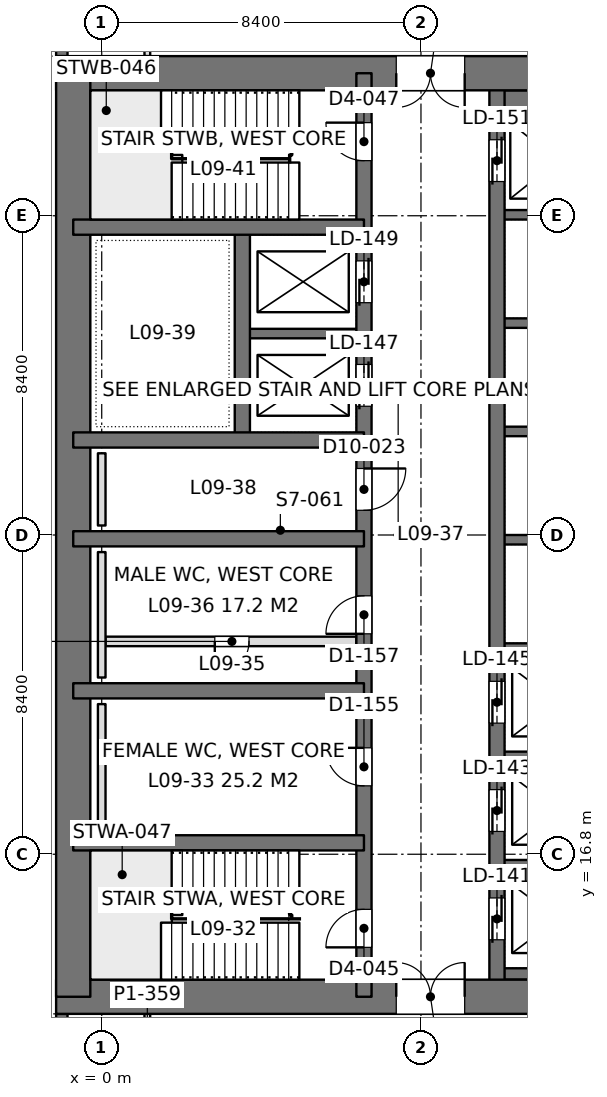
"""IFC4 building model, lengths in metres.
Left out: names, types, materials, properties, quantities, classifications, styles, units other than length and angle.
Written with IfcOpenShell. Run it as: python <this file> out.ifc"""

import sys

from ifc_helpers import new_model, si_unit, direction, frame, frame_2d, origin, place, context, subcontext, project, spatial, rectangle, extrude, element, fill, save


model = new_model("IFC4")
c1 = context("Model", 3, precision=1e-05, world=origin(), true_north=direction((0.0, 1.0)))
c2 = subcontext(c1, "Body", "Model", "MODEL_VIEW")
j1 = project(units=[si_unit("LENGTHUNIT", "METRE"), si_unit("PLANEANGLEUNIT", "RADIAN")], contexts=[c1])
p1 = place(None, origin())
s1 = spatial("IfcSite", under=j1, at=p1, CompositionType="ELEMENT")
p2 = place(p1, origin())
s2 = spatial("IfcBuilding", under=s1, at=p2, CompositionType="ELEMENT")
p3 = place(p2, frame((0.0, 0.0, 41.4)))
s3 = spatial("IfcBuildingStorey", under=s2, at=p3, CompositionType="ELEMENT", Elevation=41.4)
p4 = place(p3, frame((-1.2, 13.05, 0.0), z_axis=(0.0, 0.0, 1.0), x_axis=(1.0, 0.0, 0.0)))
e1 = element("IfcWall", 1, at=p4, inside=s3, PredefinedType="SHEAR", context=c2, shape_type="SweptSolid", body=[
    extrude(rectangle(XDim=18.0, YDim=0.9, at=frame_2d((9.0, 0.0))), origin(), (0.0, 0.0, 1.0), 4.5),
])
p5 = place(p4, frame((8.95, 0.0, 0.0)))
e2 = element("IfcOpeningElement", 2, at=p5, cuts=e1, PredefinedType="OPENING", context=c2, shape_type="SweptSolid", body=[
    extrude(rectangle(XDim=1.8, YDim=2.4, at=frame_2d((0.9, 1.2))), frame((0.0, 0.46, 0.0), z_axis=(0.0, -1.0, 0.0), x_axis=(1.0, 0.0, 0.0)), (0.0, 0.0, 1.0), 0.92),
])
p6 = place(p3, frame((-1.2, 37.35, 0.0), z_axis=(0.0, 0.0, 1.0), x_axis=(1.0, 0.0, 0.0)))
e3 = element("IfcWall", 3, at=p6, inside=s3, PredefinedType="SHEAR", context=c2, shape_type="SweptSolid", body=[
    extrude(rectangle(XDim=18.0, YDim=0.9, at=frame_2d((9.0, 0.0))), origin(), (0.0, 0.0, 1.0), 4.5),
])
p7 = place(p6, frame((8.95, 0.0, 0.0)))
e4 = element("IfcOpeningElement", 4, at=p7, cuts=e3, PredefinedType="OPENING", context=c2, shape_type="SweptSolid", body=[
    extrude(rectangle(XDim=1.8, YDim=2.4, at=frame_2d((0.9, 1.2))), frame((0.0, 0.46, 0.0), z_axis=(0.0, -1.0, 0.0), x_axis=(1.0, 0.0, 0.0)), (0.0, 0.0, 1.0), 0.92),
])
p8 = place(p3, frame((-0.75, 13.05, 0.0), z_axis=(0.0, 0.0, 1.0), x_axis=(0.0, 1.0, 0.0)))
e5 = element("IfcWall", 5, at=p8, inside=s3, PredefinedType="SHEAR", context=c2, shape_type="SweptSolid", body=[
    extrude(rectangle(XDim=24.3, YDim=0.9, at=frame_2d((12.15, 0.0))), origin(), (0.0, 0.0, 1.0), 4.5),
])
p9 = place(p3, frame((6.9, 13.05, 0.0), z_axis=(0.0, 0.0, 1.0), x_axis=(0.0, 1.0, 0.0)))
e6 = element("IfcWall", 6, at=p9, inside=s3, PredefinedType="SHEAR", context=c2, shape_type="SweptSolid", body=[
    extrude(rectangle(XDim=24.3, YDim=0.4, at=frame_2d((12.15, 0.0))), origin(), (0.0, 0.0, 1.0), 4.5),
])
p10 = place(p9, frame((1.3, 0.0, 0.0)))
e7 = element("IfcOpeningElement", 7, at=p10, cuts=e6, PredefinedType="OPENING", context=c2, shape_type="SweptSolid", body=[
    extrude(rectangle(XDim=1.0, YDim=2.2, at=frame_2d((0.5, 1.1))), frame((0.0, 0.21, 0.0), z_axis=(0.0, -1.0, 0.0), x_axis=(1.0, 0.0, 0.0)), (0.0, 0.0, 1.0), 0.42),
])
p11 = place(p9, frame((22.0, 0.0, 0.0)))
e8 = element("IfcOpeningElement", 8, at=p11, cuts=e6, PredefinedType="OPENING", context=c2, shape_type="SweptSolid", body=[
    extrude(rectangle(XDim=1.0, YDim=2.2, at=frame_2d((0.5, 1.1))), frame((0.0, 0.21, 0.0), z_axis=(0.0, -1.0, 0.0), x_axis=(1.0, 0.0, 0.0)), (0.0, 0.0, 1.0), 0.42),
])
p12 = place(p9, frame((5.55, 0.0, 0.0)))
e9 = element("IfcOpeningElement", 9, at=p12, cuts=e6, PredefinedType="OPENING", context=c2, shape_type="SweptSolid", body=[
    extrude(rectangle(XDim=1.0, YDim=2.2, at=frame_2d((0.5, 1.1))), frame((0.0, 0.21, 0.0), z_axis=(0.0, -1.0, 0.0), x_axis=(1.0, 0.0, 0.0)), (0.0, 0.0, 1.0), 0.42),
])
p13 = place(p9, frame((9.55, 0.0, 0.0)))
e10 = element("IfcOpeningElement", 10, at=p13, cuts=e6, PredefinedType="OPENING", context=c2, shape_type="SweptSolid", body=[
    extrude(rectangle(XDim=1.0, YDim=2.2, at=frame_2d((0.5, 1.1))), frame((0.0, 0.21, 0.0), z_axis=(0.0, -1.0, 0.0), x_axis=(1.0, 0.0, 0.0)), (0.0, 0.0, 1.0), 0.42),
])
p14 = place(p9, frame((12.8, 0.0, 0.0)))
e11 = element("IfcOpeningElement", 11, at=p14, cuts=e6, PredefinedType="OPENING", context=c2, shape_type="SweptSolid", body=[
    extrude(rectangle(XDim=1.1, YDim=2.2, at=frame_2d((0.55, 1.1))), frame((0.0, 0.21, 0.0), z_axis=(0.0, -1.0, 0.0), x_axis=(1.0, 0.0, 0.0)), (0.0, 0.0, 1.0), 0.42),
])
p15 = place(p9, frame((15.538, 0.0, 0.0)))
e12 = element("IfcOpeningElement", 12, at=p15, cuts=e6, PredefinedType="OPENING", context=c2, shape_type="SweptSolid", body=[
    extrude(rectangle(XDim=1.1, YDim=2.2, at=frame_2d((0.55, 1.1))), frame((0.0, 0.21, 0.0), z_axis=(0.0, -1.0, 0.0), x_axis=(1.0, 0.0, 0.0)), (0.0, 0.0, 1.0), 0.42),
])
p16 = place(p9, frame((18.262, 0.0, 0.0)))
e13 = element("IfcOpeningElement", 13, at=p16, cuts=e6, PredefinedType="OPENING", context=c2, shape_type="SweptSolid", body=[
    extrude(rectangle(XDim=1.1, YDim=2.2, at=frame_2d((0.55, 1.1))), frame((0.0, 0.21, 0.0), z_axis=(0.0, -1.0, 0.0), x_axis=(1.0, 0.0, 0.0)), (0.0, 0.0, 1.0), 0.42),
])
p17 = place(p3, frame((10.4, 13.05, 0.0), z_axis=(0.0, 0.0, 1.0), x_axis=(0.0, 1.0, 0.0)))
e14 = element("IfcWall", 14, at=p17, inside=s3, PredefinedType="SHEAR", context=c2, shape_type="SweptSolid", body=[
    extrude(rectangle(XDim=24.3, YDim=0.4, at=frame_2d((12.15, 0.0))), origin(), (0.0, 0.0, 1.0), 4.5),
])
p18 = place(p17, frame((1.5, 0.0, 0.0)))
e15 = element("IfcOpeningElement", 15, at=p18, cuts=e14, PredefinedType="OPENING", context=c2, shape_type="SweptSolid", body=[
    extrude(rectangle(XDim=1.1, YDim=2.2, at=frame_2d((0.55, 1.1))), frame((0.0, 0.21, 0.0), z_axis=(0.0, -1.0, 0.0), x_axis=(1.0, 0.0, 0.0)), (0.0, 0.0, 1.0), 0.42),
])
p19 = place(p17, frame((4.35, 0.0, 0.0)))
e16 = element("IfcOpeningElement", 16, at=p19, cuts=e14, PredefinedType="OPENING", context=c2, shape_type="SweptSolid", body=[
    extrude(rectangle(XDim=1.1, YDim=2.2, at=frame_2d((0.55, 1.1))), frame((0.0, 0.21, 0.0), z_axis=(0.0, -1.0, 0.0), x_axis=(1.0, 0.0, 0.0)), (0.0, 0.0, 1.0), 0.42),
])
p20 = place(p17, frame((7.2, 0.0, 0.0)))
e17 = element("IfcOpeningElement", 17, at=p20, cuts=e14, PredefinedType="OPENING", context=c2, shape_type="SweptSolid", body=[
    extrude(rectangle(XDim=1.1, YDim=2.2, at=frame_2d((0.55, 1.1))), frame((0.0, 0.21, 0.0), z_axis=(0.0, -1.0, 0.0), x_axis=(1.0, 0.0, 0.0)), (0.0, 0.0, 1.0), 0.42),
])
p21 = place(p17, frame((21.45, 0.0, 0.0)))
e18 = element("IfcOpeningElement", 18, at=p21, cuts=e14, PredefinedType="OPENING", context=c2, shape_type="SweptSolid", body=[
    extrude(rectangle(XDim=1.1, YDim=2.2, at=frame_2d((0.55, 1.1))), frame((0.0, 0.21, 0.0), z_axis=(0.0, -1.0, 0.0), x_axis=(1.0, 0.0, 0.0)), (0.0, 0.0, 1.0), 0.42),
])
for number, where, z_axis, x_axis in (
    (19, (-0.75, 17.1, 0.0), (0.0, 0.0, 1.0), (1.0, 0.0, 0.0)),
    (20, (-0.75, 21.1, 0.0), (0.0, 0.0, 1.0), (1.0, 0.0, 0.0)),
    (21, (-0.75, 25.1, 0.0), (0.0, 0.0, 1.0), (1.0, 0.0, 0.0)),
    (22, (-0.75, 27.7, 0.0), (0.0, 0.0, 1.0), (1.0, 0.0, 0.0)),
    (23, (-0.75, 33.3, 0.0), (0.0, 0.0, 1.0), (1.0, 0.0, 0.0)),
):
    element("IfcWall", number, at=place(p3, frame(where, z_axis=z_axis, x_axis=x_axis)), inside=s3, PredefinedType="SHEAR", context=c2, shape_type="SweptSolid", body=[
        extrude(rectangle(XDim=7.65, YDim=0.4, at=frame_2d((3.825, 0.0))), origin(), (0.0, 0.0, 1.0), 4.5),
    ])
p22 = place(p3, frame((3.7, 27.7, 0.0), z_axis=(0.0, 0.0, 1.0), x_axis=(0.0, 1.0, 0.0)))
e24 = element("IfcWall", 24, at=p22, inside=s3, PredefinedType="SHEAR", context=c2, shape_type="SweptSolid", body=[
    extrude(rectangle(XDim=5.6, YDim=0.4, at=frame_2d((2.8, 0.0))), origin(), (0.0, 0.0, 1.0), 4.5),
])
p23 = place(p3, frame((3.7, 30.5, 0.0), z_axis=(0.0, 0.0, 1.0), x_axis=(1.0, 0.0, 0.0)))
e25 = element("IfcWall", 25, at=p23, inside=s3, PredefinedType="SHEAR", context=c2, shape_type="SweptSolid", body=[
    extrude(rectangle(XDim=3.2, YDim=0.25, at=frame_2d((1.6, 0.0))), origin(), (0.0, 0.0, 1.0), 4.5),
])
p24 = place(p3, frame((10.4, 13.65, 0.0), z_axis=(0.0, 0.0, 1.0), x_axis=(1.0, 0.0, 0.0)))
e26 = element("IfcWall", 26, at=p24, inside=s3, PredefinedType="SHEAR", context=c2, shape_type="SweptSolid", body=[
    extrude(rectangle(XDim=3.2, YDim=0.3, at=frame_2d((1.6, 0.0))), origin(), (0.0, 0.0, 1.0), 4.5),
])
for number, where, z_axis, x_axis in (
    (27, (10.4, 16.525, 0.0), (0.0, 0.0, 1.0), (1.0, 0.0, 0.0)),
    (28, (10.4, 19.375, 0.0), (0.0, 0.0, 1.0), (1.0, 0.0, 0.0)),
    (29, (10.4, 22.225, 0.0), (0.0, 0.0, 1.0), (1.0, 0.0, 0.0)),
    (30, (10.4, 25.075, 0.0), (0.0, 0.0, 1.0), (1.0, 0.0, 0.0)),
    (31, (10.4, 27.925, 0.0), (0.0, 0.0, 1.0), (1.0, 0.0, 0.0)),
    (32, (10.4, 30.775, 0.0), (0.0, 0.0, 1.0), (1.0, 0.0, 0.0)),
    (33, (10.4, 33.625, 0.0), (0.0, 0.0, 1.0), (1.0, 0.0, 0.0)),
):
    element("IfcWall", number, at=place(p3, frame(where, z_axis=z_axis, x_axis=x_axis)), inside=s3, PredefinedType="SHEAR", context=c2, shape_type="SweptSolid", body=[
        extrude(rectangle(XDim=3.2, YDim=0.25, at=frame_2d((1.6, 0.0))), origin(), (0.0, 0.0, 1.0), 4.5),
    ])
p25 = place(p3, frame((10.4, 36.625, 0.0), z_axis=(0.0, 0.0, 1.0), x_axis=(1.0, 0.0, 0.0)))
e34 = element("IfcWall", 34, at=p25, inside=s3, PredefinedType="SHEAR", context=c2, shape_type="SweptSolid", body=[
    extrude(rectangle(XDim=3.2, YDim=0.55, at=frame_2d((1.6, 0.0))), origin(), (0.0, 0.0, 1.0), 4.5),
])
p26 = place(p3, frame((-1.05, 8.4, 0.0), z_axis=(0.0, 0.0, 1.0), x_axis=(0.0, 1.0, 0.0)))
e35 = element("IfcWall", 35, at=p26, inside=s3, PredefinedType="SOLIDWALL", context=c2, shape_type="SweptSolid", body=[
    extrude(rectangle(XDim=4.2, YDim=0.3, at=frame_2d((2.1, 0.0))), origin(), (0.0, 0.0, 1.0), 4.34),
])
p27 = place(p26, frame((0.9, 0.0, 0.9)))
e36 = element("IfcOpeningElement", 36, at=p27, cuts=e35, PredefinedType="OPENING", context=c2, shape_type="SweptSolid", body=[
    extrude(rectangle(XDim=2.4, YDim=1.9, at=frame_2d((1.2, 0.95))), frame((0.0, 0.16, 0.0), z_axis=(0.0, -1.0, 0.0), x_axis=(1.0, 0.0, 0.0)), (0.0, 0.0, 1.0), 0.32),
])
p28 = place(p3, frame((-1.05, 37.8, 0.0), z_axis=(0.0, 0.0, 1.0), x_axis=(0.0, 1.0, 0.0)))
e37 = element("IfcWall", 37, at=p28, inside=s3, PredefinedType="SOLIDWALL", context=c2, shape_type="SweptSolid", body=[
    extrude(rectangle(XDim=4.2, YDim=0.3, at=frame_2d((2.1, 0.0))), origin(), (0.0, 0.0, 1.0), 4.34),
])
p29 = place(p28, frame((0.9, 0.0, 0.9)))
e38 = element("IfcOpeningElement", 38, at=p29, cuts=e37, PredefinedType="OPENING", context=c2, shape_type="SweptSolid", body=[
    extrude(rectangle(XDim=2.4, YDim=1.9, at=frame_2d((1.2, 0.95))), frame((0.0, 0.16, 0.0), z_axis=(0.0, -1.0, 0.0), x_axis=(1.0, 0.0, 0.0)), (0.0, 0.0, 1.0), 0.32),
])
p30 = place(p3, frame((1.2, 10.4, 0.0), z_axis=(0.0, 0.0, 1.0), x_axis=(0.0, 1.0, 0.0)))
e39 = element("IfcWall", 39, at=p30, inside=s3, PredefinedType="PARTITIONING", context=c2, shape_type="SweptSolid", body=[
    extrude(rectangle(XDim=2.202, YDim=0.15, at=frame_2d((1.101, 0.0))), origin(), (0.0, 0.0, 1.0), 4.34),
])
p31 = place(p3, frame((1.2, 37.8, 0.0), z_axis=(0.0, 0.0, 1.0), x_axis=(0.0, 1.0, 0.0)))
e40 = element("IfcWall", 40, at=p31, inside=s3, PredefinedType="PARTITIONING", context=c2, shape_type="SweptSolid", body=[
    extrude(rectangle(XDim=2.2, YDim=0.15, at=frame_2d((1.1, 0.0))), origin(), (0.0, 0.0, 1.0), 4.34),
])
p32 = place(p3, frame((0.1, 22.4, 0.0), z_axis=(0.0, 0.0, 1.0), x_axis=(1.0, 0.0, 0.0)))
e41 = element("IfcWall", 41, at=p32, inside=s3, PredefinedType="PARTITIONING", context=c2, shape_type="SweptSolid", body=[
    extrude(rectangle(XDim=6.6, YDim=0.25, at=frame_2d((3.3, 0.0))), origin(), (0.0, 0.0, 1.0), 4.3),
])
p33 = place(p32, frame((2.875, 0.0, 0.0)))
e42 = element("IfcOpeningElement", 42, at=p33, cuts=e41, PredefinedType="OPENING", context=c2, shape_type="SweptSolid", body=[
    extrude(rectangle(XDim=0.9, YDim=2.2, at=frame_2d((0.45, 1.1))), frame((0.0, 0.135, 0.0), z_axis=(0.0, -1.0, 0.0), x_axis=(1.0, 0.0, 0.0)), (0.0, 0.0, 1.0), 0.27),
])
for number, where, z_axis, x_axis in (
    (43, (0.0, 17.45, 0.0), (0.0, 0.0, 1.0), (0.0, 1.0, 0.0)),
    (44, (0.0, 21.45, 0.0), (0.0, 0.0, 1.0), (0.0, 1.0, 0.0)),
):
    element("IfcWall", number, at=place(p3, frame(where, z_axis=z_axis, x_axis=x_axis)), inside=s3, PredefinedType="PLUMBINGWALL", context=c2, shape_type="SweptSolid", body=[
        extrude(rectangle(XDim=3.3, YDim=0.2, at=frame_2d((1.65, 0.0))), origin(), (0.0, 0.0, 1.0), 1.2),
    ])
p34 = place(p3, frame((0.0, 25.45, 0.0), z_axis=(0.0, 0.0, 1.0), x_axis=(0.0, 1.0, 0.0)))
e45 = element("IfcWall", 45, at=p34, inside=s3, PredefinedType="PLUMBINGWALL", context=c2, shape_type="SweptSolid", body=[
    extrude(rectangle(XDim=1.9, YDim=0.2, at=frame_2d((0.95, 0.0))), origin(), (0.0, 0.0, 1.0), 1.2),
])
p35 = place(p5, origin())
e46 = element("IfcDoor", 46, at=p35, inside=s3, OperationType="DOUBLE_DOOR_SINGLE_SWING", PredefinedType="DOOR", context=c2, shape_type="SweptSolid", body=[
    extrude(rectangle(XDim=1.8, YDim=2.4, at=frame_2d((0.9, 1.2))), frame((0.0, 0.025, 0.0), z_axis=(0.0, -1.0, 0.0), x_axis=(1.0, 0.0, 0.0)), (0.0, 0.0, 1.0), 0.05),
])
fill(e2, e46)
p36 = place(p7, frame((1.8, 0.0, 0.0), z_axis=(0.0, 0.0, 1.0), x_axis=(-1.0, 0.0, 0.0)))
e47 = element("IfcDoor", 47, at=p36, inside=s3, OperationType="DOUBLE_DOOR_SINGLE_SWING", PredefinedType="DOOR", context=c2, shape_type="SweptSolid", body=[
    extrude(rectangle(XDim=1.8, YDim=2.4, at=frame_2d((0.9, 1.2))), frame((0.0, 0.025, 0.0), z_axis=(0.0, -1.0, 0.0), x_axis=(1.0, 0.0, 0.0)), (0.0, 0.0, 1.0), 0.05),
])
fill(e4, e47)
p37 = place(p10, origin())
e48 = element("IfcDoor", 48, at=p37, inside=s3, OperationType="SINGLE_SWING_LEFT", PredefinedType="DOOR", context=c2, shape_type="SweptSolid", body=[
    extrude(rectangle(XDim=1.0, YDim=2.2, at=frame_2d((0.5, 1.1))), frame((0.0, 0.025, 0.0), z_axis=(0.0, -1.0, 0.0), x_axis=(1.0, 0.0, 0.0)), (0.0, 0.0, 1.0), 0.05),
])
fill(e7, e48)
p38 = place(p11, origin())
e49 = element("IfcDoor", 49, at=p38, inside=s3, OperationType="SINGLE_SWING_RIGHT", PredefinedType="DOOR", context=c2, shape_type="SweptSolid", body=[
    extrude(rectangle(XDim=1.0, YDim=2.2, at=frame_2d((0.5, 1.1))), frame((0.0, 0.025, 0.0), z_axis=(0.0, -1.0, 0.0), x_axis=(1.0, 0.0, 0.0)), (0.0, 0.0, 1.0), 0.05),
])
fill(e8, e49)
p39 = place(p12, origin())
e50 = element("IfcDoor", 50, at=p39, inside=s3, OperationType="SINGLE_SWING_RIGHT", PredefinedType="DOOR", context=c2, shape_type="SweptSolid", body=[
    extrude(rectangle(XDim=1.0, YDim=2.2, at=frame_2d((0.5, 1.1))), frame((0.0, 0.025, 0.0), z_axis=(0.0, -1.0, 0.0), x_axis=(1.0, 0.0, 0.0)), (0.0, 0.0, 1.0), 0.05),
])
fill(e9, e50)
p40 = place(p13, origin())
e51 = element("IfcDoor", 51, at=p40, inside=s3, OperationType="SINGLE_SWING_LEFT", PredefinedType="DOOR", context=c2, shape_type="SweptSolid", body=[
    extrude(rectangle(XDim=1.0, YDim=2.2, at=frame_2d((0.5, 1.1))), frame((0.0, 0.025, 0.0), z_axis=(0.0, -1.0, 0.0), x_axis=(1.0, 0.0, 0.0)), (0.0, 0.0, 1.0), 0.05),
])
fill(e10, e51)
p41 = place(p14, frame((1.1, 0.0, 0.0), z_axis=(0.0, 0.0, 1.0), x_axis=(-1.0, 0.0, 0.0)))
e52 = element("IfcDoor", 52, at=p41, inside=s3, OperationType="SINGLE_SWING_LEFT", PredefinedType="DOOR", context=c2, shape_type="SweptSolid", body=[
    extrude(rectangle(XDim=1.1, YDim=2.2, at=frame_2d((0.55, 1.1))), frame((0.0, 0.025, 0.0), z_axis=(0.0, -1.0, 0.0), x_axis=(1.0, 0.0, 0.0)), (0.0, 0.0, 1.0), 0.05),
])
fill(e11, e52)
p42 = place(p18, origin())
e53 = element("IfcDoor", 53, at=p42, inside=s3, OperationType="DOUBLE_DOOR_SLIDING", PredefinedType="DOOR", context=c2, shape_type="SweptSolid", body=[
    extrude(rectangle(XDim=1.1, YDim=2.2, at=frame_2d((0.55, 1.1))), frame((0.0, 0.025, 0.0), z_axis=(0.0, -1.0, 0.0), x_axis=(1.0, 0.0, 0.0)), (0.0, 0.0, 1.0), 0.05),
])
fill(e15, e53)
p43 = place(p19, origin())
e54 = element("IfcDoor", 54, at=p43, inside=s3, OperationType="DOUBLE_DOOR_SLIDING", PredefinedType="DOOR", context=c2, shape_type="SweptSolid", body=[
    extrude(rectangle(XDim=1.1, YDim=2.2, at=frame_2d((0.55, 1.1))), frame((0.0, 0.025, 0.0), z_axis=(0.0, -1.0, 0.0), x_axis=(1.0, 0.0, 0.0)), (0.0, 0.0, 1.0), 0.05),
])
fill(e16, e54)
p44 = place(p20, origin())
e55 = element("IfcDoor", 55, at=p44, inside=s3, OperationType="DOUBLE_DOOR_SLIDING", PredefinedType="DOOR", context=c2, shape_type="SweptSolid", body=[
    extrude(rectangle(XDim=1.1, YDim=2.2, at=frame_2d((0.55, 1.1))), frame((0.0, 0.025, 0.0), z_axis=(0.0, -1.0, 0.0), x_axis=(1.0, 0.0, 0.0)), (0.0, 0.0, 1.0), 0.05),
])
fill(e17, e55)
p45 = place(p21, origin())
e56 = element("IfcDoor", 56, at=p45, inside=s3, OperationType="DOUBLE_DOOR_SLIDING", PredefinedType="DOOR", context=c2, shape_type="SweptSolid", body=[
    extrude(rectangle(XDim=1.1, YDim=2.2, at=frame_2d((0.55, 1.1))), frame((0.0, 0.025, 0.0), z_axis=(0.0, -1.0, 0.0), x_axis=(1.0, 0.0, 0.0)), (0.0, 0.0, 1.0), 0.05),
])
fill(e18, e56)
p46 = place(p15, origin())
e57 = element("IfcDoor", 57, at=p46, inside=s3, OperationType="DOUBLE_DOOR_SLIDING", PredefinedType="DOOR", context=c2, shape_type="SweptSolid", body=[
    extrude(rectangle(XDim=1.1, YDim=2.2, at=frame_2d((0.55, 1.1))), frame((0.0, 0.025, 0.0), z_axis=(0.0, -1.0, 0.0), x_axis=(1.0, 0.0, 0.0)), (0.0, 0.0, 1.0), 0.05),
])
fill(e12, e57)
p47 = place(p16, origin())
e58 = element("IfcDoor", 58, at=p47, inside=s3, OperationType="DOUBLE_DOOR_SLIDING", PredefinedType="DOOR", context=c2, shape_type="SweptSolid", body=[
    extrude(rectangle(XDim=1.1, YDim=2.2, at=frame_2d((0.55, 1.1))), frame((0.0, 0.025, 0.0), z_axis=(0.0, -1.0, 0.0), x_axis=(1.0, 0.0, 0.0)), (0.0, 0.0, 1.0), 0.05),
])
fill(e13, e58)
p48 = place(p33, frame((0.9, 0.0, 0.0), z_axis=(0.0, 0.0, 1.0), x_axis=(-1.0, 0.0, 0.0)))
e59 = element("IfcDoor", 59, at=p48, inside=s3, OperationType="SINGLE_SWING_RIGHT", PredefinedType="DOOR", context=c2, shape_type="SweptSolid", body=[
    extrude(rectangle(XDim=0.9, YDim=2.2, at=frame_2d((0.45, 1.1))), frame((0.0, 0.025, 0.0), z_axis=(0.0, -1.0, 0.0), x_axis=(1.0, 0.0, 0.0)), (0.0, 0.0, 1.0), 0.05),
])
fill(e42, e59)
save(model, sys.argv[1])
